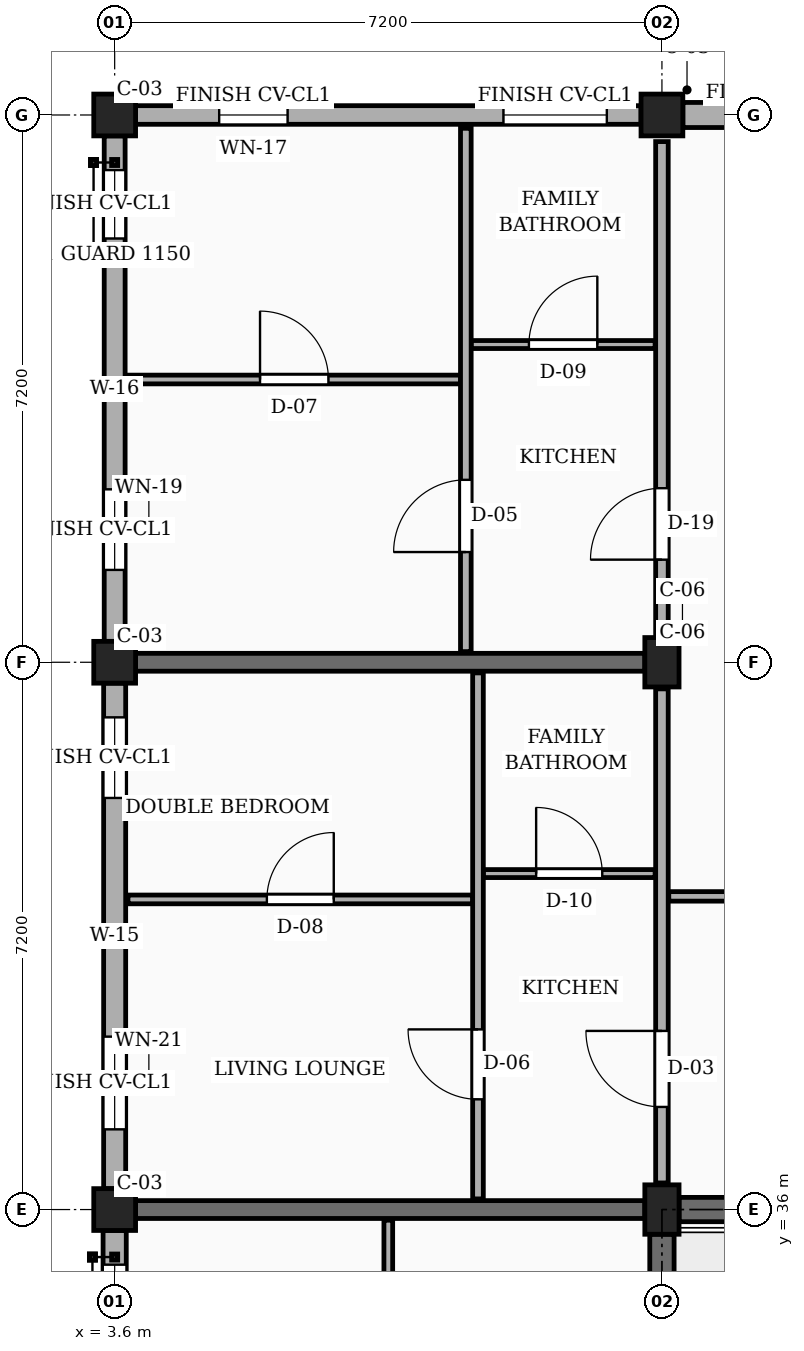
"""IFC4 building model, lengths in metres.
Left out: names, types, materials, properties, quantities, classifications, styles, units other than length and angle.
Written with IfcOpenShell. Run it as: python <this file> out.ifc"""

import sys

from ifc_helpers import new_model, si_unit, direction, frame, frame_2d, origin, origin_2d, place, context, subcontext, project, spatial, rectangle, extrude, element, fill, save


model = new_model("IFC4")
c1 = context("Model", 3, precision=1e-05, world=origin(), true_north=direction((0.0, 1.0)))
c2 = subcontext(c1, "Body", "Model", "MODEL_VIEW")
j1 = project(units=[si_unit("LENGTHUNIT", "METRE"), si_unit("PLANEANGLEUNIT", "RADIAN")], contexts=[c1])
p1 = place(None, origin())
s1 = spatial("IfcSite", under=j1, at=p1, CompositionType="ELEMENT")
p2 = place(p1, origin())
s2 = spatial("IfcBuilding", under=s1, at=p2, CompositionType="ELEMENT")
p3 = place(p2, frame((0.0, 0.0, 20.25)))
s3 = spatial("IfcBuildingStorey", under=s2, at=p3, CompositionType="ELEMENT", Elevation=20.25)
for number, where, z_axis, x_axis in (
    (1, (3.6, 36.0, 0.0), (0.0, 0.0, 1.0), (1.0, 0.0, 0.0)),
    (2, (3.6, 43.2, 0.0), (0.0, 0.0, 1.0), (1.0, 0.0, 0.0)),
    (3, (3.6, 50.4, 0.0), (0.0, 0.0, 1.0), (1.0, 0.0, 0.0)),
):
    element("IfcColumn", number, at=place(p3, frame(where, z_axis=z_axis, x_axis=x_axis)), inside=s3, PredefinedType="COLUMN", context=c2, shape_type="SweptSolid", body=[
        extrude(rectangle(XDim=0.55, YDim=0.55, at=origin_2d()), origin(), (0.0, 0.0, 1.0), 3.15),
    ])
for number, where, z_axis, x_axis in (
    (4, (10.8, 36.0, 0.0), (0.0, 0.0, 1.0), (1.0, 0.0, 0.0)),
    (5, (10.8, 43.2, 0.0), (0.0, 0.0, 1.0), (1.0, 0.0, 0.0)),
):
    element("IfcColumn", number, at=place(p3, frame(where, z_axis=z_axis, x_axis=x_axis)), inside=s3, PredefinedType="COLUMN", context=c2, shape_type="SweptSolid", body=[
        extrude(rectangle(XDim=0.45, YDim=0.65, at=origin_2d()), origin(), (0.0, 0.0, 1.0), 3.15),
    ])
p4 = place(p3, frame((10.8, 50.4, 0.0), z_axis=(0.0, 0.0, 1.0), x_axis=(1.0, 0.0, 0.0)))
e6 = element("IfcColumn", 6, at=p4, inside=s3, PredefinedType="COLUMN", context=c2, shape_type="SweptSolid", body=[
    extrude(rectangle(XDim=0.55, YDim=0.55, at=origin_2d()), origin(), (0.0, 0.0, 1.0), 3.15),
])
for number, where, z_axis, x_axis in (
    (7, (3.875, 36.0, 0.0), (0.0, 0.0, 1.0), (1.0, 0.0, 0.0)),
    (8, (3.875, 43.2, 0.0), (0.0, 0.0, 1.0), (1.0, 0.0, 0.0)),
):
    element("IfcWall", number, at=place(p3, frame(where, z_axis=z_axis, x_axis=x_axis)), inside=s3, PredefinedType="SOLIDWALL", context=c2, shape_type="SweptSolid", body=[
        extrude(rectangle(XDim=6.7, YDim=0.235, at=frame_2d((3.35, 0.0))), origin(), (0.0, 0.0, 1.0), 2.17),
    ])
p5 = place(p3, frame((17.725, 50.4, 0.0), z_axis=(0.0, 0.0, 1.0), x_axis=(-1.0, 0.0, 0.0)))
e9 = element("IfcWall", 9, at=p5, inside=s3, PredefinedType="SOLIDWALL", context=c2, shape_type="SweptSolid", body=[
    extrude(rectangle(XDim=6.65, YDim=0.33, at=frame_2d((3.325, 0.0))), origin(), (0.0, 0.0, 1.0), 2.44),
])
p6 = place(p5, frame((0.45, 0.0, 0.78)))
e10 = element("IfcOpeningElement", 10, at=p6, cuts=e9, PredefinedType="OPENING", context=c2, shape_type="SweptSolid", body=[
    extrude(rectangle(XDim=1.2, YDim=1.26, at=frame_2d((0.6, 0.63))), frame((0.0, 0.175, 0.0), z_axis=(0.0, -1.0, 0.0), x_axis=(1.0, 0.0, 0.0)), (0.0, 0.0, 1.0), 0.35),
])
p7 = place(p5, frame((4.65, 0.0, 0.78)))
e11 = element("IfcOpeningElement", 11, at=p7, cuts=e9, PredefinedType="OPENING", context=c2, shape_type="SweptSolid", body=[
    extrude(rectangle(XDim=1.36, YDim=1.26, at=frame_2d((0.68, 0.63))), frame((0.0, 0.175, 0.0), z_axis=(0.0, -1.0, 0.0), x_axis=(1.0, 0.0, 0.0)), (0.0, 0.0, 1.0), 0.35),
])
p8 = place(p3, frame((10.525, 50.4, 0.0), z_axis=(0.0, 0.0, 1.0), x_axis=(-1.0, 0.0, 0.0)))
e12 = element("IfcWall", 12, at=p8, inside=s3, PredefinedType="SOLIDWALL", context=c2, shape_type="SweptSolid", body=[
    extrude(rectangle(XDim=6.65, YDim=0.245, at=frame_2d((3.325, 0.0))), origin(), (0.0, 0.0, 1.0), 2.44),
])
p9 = place(p8, frame((0.45, 0.0, 0.78)))
e13 = element("IfcOpeningElement", 13, at=p9, cuts=e12, PredefinedType="OPENING", context=c2, shape_type="SweptSolid", body=[
    extrude(rectangle(XDim=1.36, YDim=1.26, at=frame_2d((0.68, 0.63))), frame((0.0, 0.133, 0.0), z_axis=(0.0, -1.0, 0.0), x_axis=(1.0, 0.0, 0.0)), (0.0, 0.0, 1.0), 0.265),
])
p10 = place(p8, frame((4.65, 0.0, 0.78)))
e14 = element("IfcOpeningElement", 14, at=p10, cuts=e12, PredefinedType="OPENING", context=c2, shape_type="SweptSolid", body=[
    extrude(rectangle(XDim=0.9, YDim=1.36, at=frame_2d((0.45, 0.68))), frame((0.0, 0.133, 0.0), z_axis=(0.0, -1.0, 0.0), x_axis=(1.0, 0.0, 0.0)), (0.0, 0.0, 1.0), 0.265),
])
p11 = place(p3, frame((3.6, 50.125, 0.0), z_axis=(0.0, 0.0, 1.0), x_axis=(0.0, -1.0, 0.0)))
e15 = element("IfcWall", 15, at=p11, inside=s3, PredefinedType="SOLIDWALL", context=c2, shape_type="SweptSolid", body=[
    extrude(rectangle(XDim=6.65, YDim=0.275, at=frame_2d((3.325, 0.0))), origin(), (0.0, 0.0, 1.0), 2.44),
])
p12 = place(p11, frame((0.45, 0.0, 0.78)))
e16 = element("IfcOpeningElement", 16, at=p12, cuts=e15, PredefinedType="OPENING", context=c2, shape_type="SweptSolid", body=[
    extrude(rectangle(XDim=0.9, YDim=1.36, at=frame_2d((0.45, 0.68))), frame((0.0, 0.147, 0.0), z_axis=(0.0, -1.0, 0.0), x_axis=(1.0, 0.0, 0.0)), (0.0, 0.0, 1.0), 0.295),
])
p13 = place(p11, frame((4.65, 0.0, 0.78)))
e17 = element("IfcOpeningElement", 17, at=p13, cuts=e15, PredefinedType="OPENING", context=c2, shape_type="SweptSolid", body=[
    extrude(rectangle(XDim=1.06, YDim=1.36, at=frame_2d((0.53, 0.68))), frame((0.0, 0.147, 0.0), z_axis=(0.0, -1.0, 0.0), x_axis=(1.0, 0.0, 0.0)), (0.0, 0.0, 1.0), 0.295),
])
p14 = place(p3, frame((3.6, 42.925, 0.0), z_axis=(0.0, 0.0, 1.0), x_axis=(0.0, -1.0, 0.0)))
e18 = element("IfcWall", 18, at=p14, inside=s3, PredefinedType="SOLIDWALL", context=c2, shape_type="SweptSolid", body=[
    extrude(rectangle(XDim=6.65, YDim=0.29, at=frame_2d((3.325, 0.0))), origin(), (0.0, 0.0, 1.0), 2.44),
])
p15 = place(p14, frame((0.45, 0.0, 0.78)))
e19 = element("IfcOpeningElement", 19, at=p15, cuts=e18, PredefinedType="OPENING", context=c2, shape_type="SweptSolid", body=[
    extrude(rectangle(XDim=1.06, YDim=1.36, at=frame_2d((0.53, 0.68))), frame((0.0, 0.155, 0.0), z_axis=(0.0, -1.0, 0.0), x_axis=(1.0, 0.0, 0.0)), (0.0, 0.0, 1.0), 0.31),
])
p16 = place(p14, frame((4.65, 0.0, 0.78)))
e20 = element("IfcOpeningElement", 20, at=p16, cuts=e18, PredefinedType="OPENING", context=c2, shape_type="SweptSolid", body=[
    extrude(rectangle(XDim=1.22, YDim=1.36, at=frame_2d((0.61, 0.68))), frame((0.0, 0.155, 0.0), z_axis=(0.0, -1.0, 0.0), x_axis=(1.0, 0.0, 0.0)), (0.0, 0.0, 1.0), 0.31),
])
p17 = place(p3, frame((3.6, 35.725, 0.0), z_axis=(0.0, 0.0, 1.0), x_axis=(0.0, -1.0, 0.0)))
e21 = element("IfcWall", 21, at=p17, inside=s3, PredefinedType="SOLIDWALL", context=c2, shape_type="SweptSolid", body=[
    extrude(rectangle(XDim=6.65, YDim=0.305, at=frame_2d((3.325, 0.0))), origin(), (0.0, 0.0, 1.0), 2.44),
])
p18 = place(p17, frame((0.45, 0.0, 0.78)))
e22 = element("IfcOpeningElement", 22, at=p18, cuts=e21, PredefinedType="OPENING", context=c2, shape_type="SweptSolid", body=[
    extrude(rectangle(XDim=1.22, YDim=1.36, at=frame_2d((0.61, 0.68))), frame((0.0, 0.163, 0.0), z_axis=(0.0, -1.0, 0.0), x_axis=(1.0, 0.0, 0.0)), (0.0, 0.0, 1.0), 0.325),
])
p19 = place(p17, frame((4.65, 0.0, 0.78)))
e23 = element("IfcOpeningElement", 23, at=p19, cuts=e21, PredefinedType="OPENING", context=c2, shape_type="SweptSolid", body=[
    extrude(rectangle(XDim=1.38, YDim=1.36, at=frame_2d((0.69, 0.68))), frame((0.0, 0.163, 0.0), z_axis=(0.0, -1.0, 0.0), x_axis=(1.0, 0.0, 0.0)), (0.0, 0.0, 1.0), 0.325),
])
p20 = place(p3, frame((10.8, 29.125, 0.0), z_axis=(0.0, 0.0, 1.0), x_axis=(0.0, 1.0, 0.0)))
e24 = element("IfcWall", 24, at=p20, inside=s3, PredefinedType="SHEAR", context=c2, shape_type="SweptSolid", body=[
    extrude(rectangle(XDim=6.55, YDim=0.32, at=frame_2d((3.275, 0.0))), origin(), (0.0, 0.0, 1.0), 2.87),
])
p21 = place(p3, frame((11.025, 36.0, 0.0), z_axis=(0.0, 0.0, 1.0), x_axis=(1.0, 0.0, 0.0)))
e25 = element("IfcWall", 25, at=p21, inside=s3, PredefinedType="SHEAR", context=c2, shape_type="SweptSolid", body=[
    extrude(rectangle(XDim=6.75, YDim=0.32, at=frame_2d((3.375, 0.0))), origin(), (0.0, 0.0, 1.0), 2.87),
])
p22 = place(p3, frame((10.8, 36.35, 0.0), z_axis=(0.0, 0.0, 1.0), x_axis=(0.0, 1.0, 0.0)))
e26 = element("IfcWall", 26, at=p22, inside=s3, PredefinedType="PARTITIONING", context=c2, shape_type="SweptSolid", body=[
    extrude(rectangle(XDim=6.5, YDim=0.165, at=frame_2d((3.25, 0.0))), origin(), (0.0, 0.0, 1.0), 2.305),
])
p23 = place(p22, frame((1.0, 0.0, 0.0)))
e27 = element("IfcOpeningElement", 27, at=p23, cuts=e26, PredefinedType="OPENING", context=c2, shape_type="SweptSolid", body=[
    extrude(rectangle(XDim=1.0, YDim=2.15, at=frame_2d((0.5, 1.075))), frame((0.0, 0.093, 0.0), z_axis=(0.0, -1.0, 0.0), x_axis=(1.0, 0.0, 0.0)), (0.0, 0.0, 1.0), 0.185),
])
p24 = place(p3, frame((10.8, 43.55, 0.0), z_axis=(0.0, 0.0, 1.0), x_axis=(0.0, 1.0, 0.0)))
e28 = element("IfcWall", 28, at=p24, inside=s3, PredefinedType="PARTITIONING", context=c2, shape_type="SweptSolid", body=[
    extrude(rectangle(XDim=6.5, YDim=0.165, at=frame_2d((3.25, 0.0))), origin(), (0.0, 0.0, 1.0), 2.305),
])
p25 = place(p24, frame((1.0, 0.0, 0.0)))
e29 = element("IfcOpeningElement", 29, at=p25, cuts=e28, PredefinedType="OPENING", context=c2, shape_type="SweptSolid", body=[
    extrude(rectangle(XDim=0.94, YDim=2.12, at=frame_2d((0.47, 1.06))), frame((0.0, 0.093, 0.0), z_axis=(0.0, -1.0, 0.0), x_axis=(1.0, 0.0, 0.0)), (0.0, 0.0, 1.0), 0.185),
])
p26 = place(p3, frame((7.2, 28.94, 0.0), z_axis=(0.0, 0.0, 1.0), x_axis=(0.0, 1.0, 0.0)))
e30 = element("IfcWall", 30, at=p26, inside=s3, PredefinedType="PARTITIONING", context=c2, shape_type="SweptSolid", body=[
    extrude(rectangle(XDim=6.92, YDim=0.115, at=frame_2d((3.46, 0.0))), origin(), (0.0, 0.0, 1.0), 2.305),
])
p27 = place(p26, frame((1.05, 0.0, 0.0)))
e31 = element("IfcOpeningElement", 31, at=p27, cuts=e30, PredefinedType="OPENING", context=c2, shape_type="SweptSolid", body=[
    extrude(rectangle(XDim=0.87, YDim=2.05, at=frame_2d((0.435, 1.025))), frame((0.0, 0.067, 0.0), z_axis=(0.0, -1.0, 0.0), x_axis=(1.0, 0.0, 0.0)), (0.0, 0.0, 1.0), 0.135),
])
p28 = place(p26, frame((4.45, 0.0, 0.0)))
e32 = element("IfcOpeningElement", 32, at=p28, cuts=e30, PredefinedType="OPENING", context=c2, shape_type="SweptSolid", body=[
    extrude(rectangle(XDim=0.88, YDim=2.08, at=frame_2d((0.44, 1.04))), frame((0.0, 0.067, 0.0), z_axis=(0.0, -1.0, 0.0), x_axis=(1.0, 0.0, 0.0)), (0.0, 0.0, 1.0), 0.135),
])
p29 = place(p3, frame((10.89, 40.12, 0.0), z_axis=(0.0, 0.0, 1.0), x_axis=(1.0, 0.0, 0.0)))
e33 = element("IfcWall", 33, at=p29, inside=s3, PredefinedType="PARTITIONING", context=c2, shape_type="SweptSolid", body=[
    extrude(rectangle(XDim=7.02, YDim=0.125, at=frame_2d((3.51, 0.0))), origin(), (0.0, 0.0, 1.0), 2.305),
])
p30 = place(p29, frame((2.85, 0.0, 0.0)))
e34 = element("IfcOpeningElement", 34, at=p30, cuts=e33, PredefinedType="OPENING", context=c2, shape_type="SweptSolid", body=[
    extrude(rectangle(XDim=1.02, YDim=2.15, at=frame_2d((0.51, 1.075))), frame((0.0, 0.073, 0.0), z_axis=(0.0, -1.0, 0.0), x_axis=(1.0, 0.0, 0.0)), (0.0, 0.0, 1.0), 0.145),
])
p31 = place(p3, frame((3.775, 40.08, 0.0), z_axis=(0.0, 0.0, 1.0), x_axis=(1.0, 0.0, 0.0)))
e35 = element("IfcWall", 35, at=p31, inside=s3, PredefinedType="PARTITIONING", context=c2, shape_type="SweptSolid", body=[
    extrude(rectangle(XDim=4.535, YDim=0.115, at=frame_2d((2.268, 0.0))), origin(), (0.0, 0.0, 1.0), 2.305),
])
p32 = place(p31, frame((1.827, 0.0, 0.0)))
e36 = element("IfcOpeningElement", 36, at=p32, cuts=e35, PredefinedType="OPENING", context=c2, shape_type="SweptSolid", body=[
    extrude(rectangle(XDim=0.88, YDim=2.08, at=frame_2d((0.44, 1.04))), frame((0.0, 0.067, 0.0), z_axis=(0.0, -1.0, 0.0), x_axis=(1.0, 0.0, 0.0)), (0.0, 0.0, 1.0), 0.135),
])
p33 = place(p3, frame((8.45, 40.42, 0.0), z_axis=(0.0, 0.0, 1.0), x_axis=(1.0, 0.0, 0.0)))
e37 = element("IfcWall", 37, at=p33, inside=s3, PredefinedType="PARTITIONING", context=c2, shape_type="SweptSolid", body=[
    extrude(rectangle(XDim=2.26, YDim=0.105, at=frame_2d((1.13, 0.0))), origin(), (0.0, 0.0, 1.0), 2.305),
])
p34 = place(p33, frame((0.695, 0.0, 0.0)))
e38 = element("IfcOpeningElement", 38, at=p34, cuts=e37, PredefinedType="OPENING", context=c2, shape_type="SweptSolid", body=[
    extrude(rectangle(XDim=0.87, YDim=2.05, at=frame_2d((0.435, 1.025))), frame((0.0, 0.062, 0.0), z_axis=(0.0, -1.0, 0.0), x_axis=(1.0, 0.0, 0.0)), (0.0, 0.0, 1.0), 0.125),
])
p35 = place(p3, frame((8.38, 36.14, 0.0), z_axis=(0.0, 0.0, 1.0), x_axis=(0.0, 1.0, 0.0)))
e39 = element("IfcWall", 39, at=p35, inside=s3, PredefinedType="PARTITIONING", context=c2, shape_type="SweptSolid", body=[
    extrude(rectangle(XDim=6.92, YDim=0.14, at=frame_2d((3.46, 0.0))), origin(), (0.0, 0.0, 1.0), 2.305),
])
p36 = place(p35, frame((1.31, 0.0, 0.0)))
e40 = element("IfcOpeningElement", 40, at=p36, cuts=e39, PredefinedType="OPENING", context=c2, shape_type="SweptSolid", body=[
    extrude(rectangle(XDim=0.92, YDim=2.1, at=frame_2d((0.46, 1.05))), frame((0.0, 0.08, 0.0), z_axis=(0.0, -1.0, 0.0), x_axis=(1.0, 0.0, 0.0)), (0.0, 0.0, 1.0), 0.16),
])
p37 = place(p3, frame((3.775, 46.92, 0.0), z_axis=(0.0, 0.0, 1.0), x_axis=(1.0, 0.0, 0.0)))
e41 = element("IfcWall", 41, at=p37, inside=s3, PredefinedType="PARTITIONING", context=c2, shape_type="SweptSolid", body=[
    extrude(rectangle(XDim=4.375, YDim=0.115, at=frame_2d((2.188, 0.0))), origin(), (0.0, 0.0, 1.0), 2.305),
])
p38 = place(p37, frame((1.738, 0.0, 0.0)))
e42 = element("IfcOpeningElement", 42, at=p38, cuts=e41, PredefinedType="OPENING", context=c2, shape_type="SweptSolid", body=[
    extrude(rectangle(XDim=0.9, YDim=2.1, at=frame_2d((0.45, 1.05))), frame((0.0, 0.067, 0.0), z_axis=(0.0, -1.0, 0.0), x_axis=(1.0, 0.0, 0.0)), (0.0, 0.0, 1.0), 0.135),
])
p39 = place(p3, frame((8.29, 47.38, 0.0), z_axis=(0.0, 0.0, 1.0), x_axis=(1.0, 0.0, 0.0)))
e43 = element("IfcWall", 43, at=p39, inside=s3, PredefinedType="PARTITIONING", context=c2, shape_type="SweptSolid", body=[
    extrude(rectangle(XDim=2.42, YDim=0.105, at=frame_2d((1.21, 0.0))), origin(), (0.0, 0.0, 1.0), 2.305),
])
p40 = place(p39, frame((0.76, 0.0, 0.0)))
e44 = element("IfcOpeningElement", 44, at=p40, cuts=e43, PredefinedType="OPENING", context=c2, shape_type="SweptSolid", body=[
    extrude(rectangle(XDim=0.9, YDim=2.05, at=frame_2d((0.45, 1.025))), frame((0.0, 0.062, 0.0), z_axis=(0.0, -1.0, 0.0), x_axis=(1.0, 0.0, 0.0)), (0.0, 0.0, 1.0), 0.125),
])
p41 = place(p3, frame((8.22, 43.34, 0.0), z_axis=(0.0, 0.0, 1.0), x_axis=(0.0, 1.0, 0.0)))
e45 = element("IfcWall", 45, at=p41, inside=s3, PredefinedType="PARTITIONING", context=c2, shape_type="SweptSolid", body=[
    extrude(rectangle(XDim=6.885, YDim=0.14, at=frame_2d((3.442, 0.0))), origin(), (0.0, 0.0, 1.0), 2.305),
])
p42 = place(p41, frame((1.31, 0.0, 0.0)))
e46 = element("IfcOpeningElement", 46, at=p42, cuts=e45, PredefinedType="OPENING", context=c2, shape_type="SweptSolid", body=[
    extrude(rectangle(XDim=0.95, YDim=2.1, at=frame_2d((0.475, 1.05))), frame((0.0, 0.08, 0.0), z_axis=(0.0, -1.0, 0.0), x_axis=(1.0, 0.0, 0.0)), (0.0, 0.0, 1.0), 0.16),
])
p43 = place(p9, origin())
e47 = element("IfcWindow", 47, at=p43, inside=s3, PartitioningType="SINGLE_PANEL", PredefinedType="WINDOW", context=c2, shape_type="SweptSolid", body=[
    extrude(rectangle(XDim=1.36, YDim=1.26, at=frame_2d((0.68, 0.63))), frame((0.0, 0.03, 0.0), z_axis=(0.0, -1.0, 0.0), x_axis=(1.0, 0.0, 0.0)), (0.0, 0.0, 1.0), 0.06),
])
fill(e13, e47)
p44 = place(p10, origin())
e48 = element("IfcWindow", 48, at=p44, inside=s3, PartitioningType="SINGLE_PANEL", PredefinedType="WINDOW", context=c2, shape_type="SweptSolid", body=[
    extrude(rectangle(XDim=0.9, YDim=1.36, at=frame_2d((0.45, 0.68))), frame((0.0, 0.03, 0.0), z_axis=(0.0, -1.0, 0.0), x_axis=(1.0, 0.0, 0.0)), (0.0, 0.0, 1.0), 0.06),
])
fill(e14, e48)
p45 = place(p12, origin())
e49 = element("IfcWindow", 49, at=p45, inside=s3, PartitioningType="SINGLE_PANEL", PredefinedType="WINDOW", context=c2, shape_type="SweptSolid", body=[
    extrude(rectangle(XDim=0.9, YDim=1.36, at=frame_2d((0.45, 0.68))), frame((0.0, 0.03, 0.0), z_axis=(0.0, -1.0, 0.0), x_axis=(1.0, 0.0, 0.0)), (0.0, 0.0, 1.0), 0.06),
])
fill(e16, e49)
p46 = place(p13, origin())
e50 = element("IfcWindow", 50, at=p46, inside=s3, PartitioningType="SINGLE_PANEL", PredefinedType="WINDOW", context=c2, shape_type="SweptSolid", body=[
    extrude(rectangle(XDim=1.06, YDim=1.36, at=frame_2d((0.53, 0.68))), frame((0.0, 0.03, 0.0), z_axis=(0.0, -1.0, 0.0), x_axis=(1.0, 0.0, 0.0)), (0.0, 0.0, 1.0), 0.06),
])
fill(e17, e50)
p47 = place(p15, origin())
e51 = element("IfcWindow", 51, at=p47, inside=s3, PartitioningType="SINGLE_PANEL", PredefinedType="WINDOW", context=c2, shape_type="SweptSolid", body=[
    extrude(rectangle(XDim=1.06, YDim=1.36, at=frame_2d((0.53, 0.68))), frame((0.0, 0.03, 0.0), z_axis=(0.0, -1.0, 0.0), x_axis=(1.0, 0.0, 0.0)), (0.0, 0.0, 1.0), 0.06),
])
fill(e19, e51)
p48 = place(p16, origin())
e52 = element("IfcWindow", 52, at=p48, inside=s3, PartitioningType="SINGLE_PANEL", PredefinedType="WINDOW", context=c2, shape_type="SweptSolid", body=[
    extrude(rectangle(XDim=1.22, YDim=1.36, at=frame_2d((0.61, 0.68))), frame((0.0, 0.03, 0.0), z_axis=(0.0, -1.0, 0.0), x_axis=(1.0, 0.0, 0.0)), (0.0, 0.0, 1.0), 0.06),
])
fill(e20, e52)
p49 = place(p18, origin())
e53 = element("IfcWindow", 53, at=p49, inside=s3, PartitioningType="SINGLE_PANEL", PredefinedType="WINDOW", context=c2, shape_type="SweptSolid", body=[
    extrude(rectangle(XDim=1.22, YDim=1.36, at=frame_2d((0.61, 0.68))), frame((0.0, 0.03, 0.0), z_axis=(0.0, -1.0, 0.0), x_axis=(1.0, 0.0, 0.0)), (0.0, 0.0, 1.0), 0.06),
])
fill(e22, e53)
p50 = place(p23, origin())
e54 = element("IfcDoor", 54, at=p50, inside=s3, OperationType="SINGLE_SWING_RIGHT", PredefinedType="DOOR", context=c2, shape_type="SweptSolid", body=[
    extrude(rectangle(XDim=1.0, YDim=2.15, at=frame_2d((0.5, 1.075))), frame((0.0, 0.025, 0.0), z_axis=(0.0, -1.0, 0.0), x_axis=(1.0, 0.0, 0.0)), (0.0, 0.0, 1.0), 0.05),
])
fill(e27, e54)
p51 = place(p25, origin())
e55 = element("IfcDoor", 55, at=p51, inside=s3, OperationType="SINGLE_SWING_LEFT", PredefinedType="DOOR", context=c2, shape_type="SweptSolid", body=[
    extrude(rectangle(XDim=0.94, YDim=2.12, at=frame_2d((0.47, 1.06))), frame((0.0, 0.025, 0.0), z_axis=(0.0, -1.0, 0.0), x_axis=(1.0, 0.0, 0.0)), (0.0, 0.0, 1.0), 0.05),
])
fill(e29, e55)
p52 = place(p32, origin())
e56 = element("IfcDoor", 56, at=p52, inside=s3, OperationType="SINGLE_SWING_RIGHT", PredefinedType="DOOR", context=c2, shape_type="SweptSolid", body=[
    extrude(rectangle(XDim=0.88, YDim=2.08, at=frame_2d((0.44, 1.04))), frame((0.0, 0.025, 0.0), z_axis=(0.0, -1.0, 0.0), x_axis=(1.0, 0.0, 0.0)), (0.0, 0.0, 1.0), 0.05),
])
fill(e36, e56)
p53 = place(p34, origin())
e57 = element("IfcDoor", 57, at=p53, inside=s3, OperationType="SINGLE_SWING_LEFT", PredefinedType="DOOR", context=c2, shape_type="SweptSolid", body=[
    extrude(rectangle(XDim=0.87, YDim=2.05, at=frame_2d((0.435, 1.025))), frame((0.0, 0.025, 0.0), z_axis=(0.0, -1.0, 0.0), x_axis=(1.0, 0.0, 0.0)), (0.0, 0.0, 1.0), 0.05),
])
fill(e38, e57)
p54 = place(p36, origin())
e58 = element("IfcDoor", 58, at=p54, inside=s3, OperationType="SINGLE_SWING_RIGHT", PredefinedType="DOOR", context=c2, shape_type="SweptSolid", body=[
    extrude(rectangle(XDim=0.92, YDim=2.1, at=frame_2d((0.46, 1.05))), frame((0.0, 0.025, 0.0), z_axis=(0.0, -1.0, 0.0), x_axis=(1.0, 0.0, 0.0)), (0.0, 0.0, 1.0), 0.05),
])
fill(e40, e58)
p55 = place(p38, origin())
e59 = element("IfcDoor", 59, at=p55, inside=s3, OperationType="SINGLE_SWING_LEFT", PredefinedType="DOOR", context=c2, shape_type="SweptSolid", body=[
    extrude(rectangle(XDim=0.9, YDim=2.1, at=frame_2d((0.45, 1.05))), frame((0.0, 0.025, 0.0), z_axis=(0.0, -1.0, 0.0), x_axis=(1.0, 0.0, 0.0)), (0.0, 0.0, 1.0), 0.05),
])
fill(e42, e59)
p56 = place(p40, origin())
e60 = element("IfcDoor", 60, at=p56, inside=s3, OperationType="SINGLE_SWING_RIGHT", PredefinedType="DOOR", context=c2, shape_type="SweptSolid", body=[
    extrude(rectangle(XDim=0.9, YDim=2.05, at=frame_2d((0.45, 1.025))), frame((0.0, 0.025, 0.0), z_axis=(0.0, -1.0, 0.0), x_axis=(1.0, 0.0, 0.0)), (0.0, 0.0, 1.0), 0.05),
])
fill(e44, e60)
p57 = place(p42, origin())
e61 = element("IfcDoor", 61, at=p57, inside=s3, OperationType="SINGLE_SWING_LEFT", PredefinedType="DOOR", context=c2, shape_type="SweptSolid", body=[
    extrude(rectangle(XDim=0.95, YDim=2.1, at=frame_2d((0.475, 1.05))), frame((0.0, 0.025, 0.0), z_axis=(0.0, -1.0, 0.0), x_axis=(1.0, 0.0, 0.0)), (0.0, 0.0, 1.0), 0.05),
])
fill(e46, e61)
save(model, sys.argv[1])
